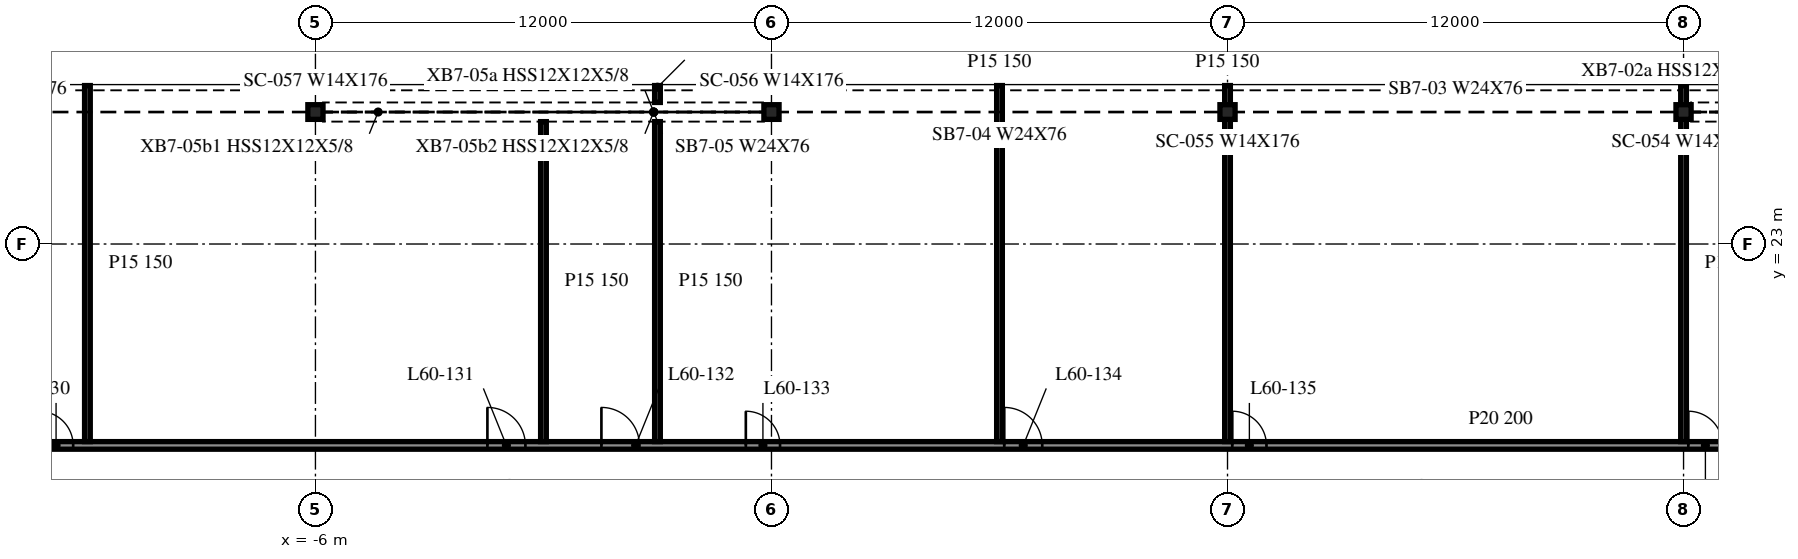
"""IFC4 building model, lengths in metres.
Left out: names, types, materials, properties, quantities, classifications, styles, units other than length and angle.
Written with IfcOpenShell. Run it as: python <this file> out.ifc"""

import sys

from ifc_helpers import new_model, si_unit, direction, frame, frame_2d, origin, origin_2d, place, context, subcontext, project, spatial, rectangle, i_section, extrude, element, fill, save


model = new_model("IFC4")
c1 = context("Model", 3, precision=1e-05, world=origin(), true_north=direction((0.0, 1.0)))
c2 = subcontext(c1, "Body", "Model", "MODEL_VIEW")
j1 = project(units=[si_unit("LENGTHUNIT", "METRE"), si_unit("PLANEANGLEUNIT", "RADIAN")], contexts=[c1])
p1 = place(None, origin())
s1 = spatial("IfcSite", under=j1, at=p1, CompositionType="ELEMENT")
p2 = place(p1, origin())
s2 = spatial("IfcBuilding", under=s1, at=p2, CompositionType="ELEMENT")
p3 = place(p2, frame((0.0, 0.0, 247.6)))
s3 = spatial("IfcBuildingStorey", under=s2, at=p3, CompositionType="ELEMENT", Elevation=247.6)
for number, where, z_axis, x_axis in (
    (1, (30.0, 26.473, -0.34), (0.0, 0.0, 1.0), (1.0, 0.0, 0.0)),
    (2, (18.0, 26.473, -0.34), (0.0, 0.0, 1.0), (1.0, 0.0, 0.0)),
    (3, (6.0, 26.473, -0.34), (0.0, 0.0, 1.0), (1.0, 0.0, 0.0)),
    (4, (-6.0, 26.473, -0.34), (0.0, 0.0, 1.0), (1.0, 0.0, 0.0)),
):
    element("IfcColumn", number, at=place(p3, frame(where, z_axis=z_axis, x_axis=x_axis)), inside=s3, PredefinedType="COLUMN", context=c2, shape_type="SweptSolid", body=[
        extrude(i_section(OverallWidth=0.399, OverallDepth=0.386, WebThickness=0.021, FlangeThickness=0.033, at=origin_2d()), origin(), (0.0, 0.0, 1.0), 3.8),
    ])
p4 = place(p3, frame((-41.975, 17.7, 0.0), z_axis=(0.0, 0.0, 1.0), x_axis=(1.0, 0.0, 0.0)))
e5 = element("IfcWall", 5, at=p4, inside=s3, PredefinedType="PARTITIONING", context=c2, shape_type="SweptSolid", body=[
    extrude(rectangle(XDim=95.95, YDim=0.2, at=frame_2d((47.975, 0.0))), origin(), (0.0, 0.0, 1.0), 3.46),
])
p5 = place(p4, frame((10.7, 0.0, 0.0)))
e6 = element("IfcOpeningElement", 6, at=p5, cuts=e5, PredefinedType="OPENING", context=c2, shape_type="SweptSolid", body=[
    extrude(rectangle(XDim=0.9, YDim=2.1, at=frame_2d((0.45, 1.05))), frame((0.0, 0.11, 0.0), z_axis=(0.0, -1.0, 0.0), x_axis=(1.0, 0.0, 0.0)), (0.0, 0.0, 1.0), 0.22),
])
p6 = place(p4, frame((13.5, 0.0, 0.0)))
e7 = element("IfcOpeningElement", 7, at=p6, cuts=e5, PredefinedType="OPENING", context=c2, shape_type="SweptSolid", body=[
    extrude(rectangle(XDim=1.0, YDim=2.1, at=frame_2d((0.5, 1.05))), frame((0.0, 0.11, 0.0), z_axis=(0.0, -1.0, 0.0), x_axis=(1.0, 0.0, 0.0)), (0.0, 0.0, 1.0), 0.22),
])
p7 = place(p4, frame((22.7, 0.0, 0.0)))
e8 = element("IfcOpeningElement", 8, at=p7, cuts=e5, PredefinedType="OPENING", context=c2, shape_type="SweptSolid", body=[
    extrude(rectangle(XDim=0.9, YDim=2.1, at=frame_2d((0.45, 1.05))), frame((0.0, 0.11, 0.0), z_axis=(0.0, -1.0, 0.0), x_axis=(1.0, 0.0, 0.0)), (0.0, 0.0, 1.0), 0.22),
])
p8 = place(p4, frame((28.7, 0.0, 0.0)))
e9 = element("IfcOpeningElement", 9, at=p8, cuts=e5, PredefinedType="OPENING", context=c2, shape_type="SweptSolid", body=[
    extrude(rectangle(XDim=0.9, YDim=2.1, at=frame_2d((0.45, 1.05))), frame((0.0, 0.11, 0.0), z_axis=(0.0, -1.0, 0.0), x_axis=(1.0, 0.0, 0.0)), (0.0, 0.0, 1.0), 0.22),
])
p9 = place(p4, frame((40.5, 0.0, 0.0)))
e10 = element("IfcOpeningElement", 10, at=p9, cuts=e5, PredefinedType="OPENING", context=c2, shape_type="SweptSolid", body=[
    extrude(rectangle(XDim=1.0, YDim=2.1, at=frame_2d((0.5, 1.05))), frame((0.0, 0.11, 0.0), z_axis=(0.0, -1.0, 0.0), x_axis=(1.0, 0.0, 0.0)), (0.0, 0.0, 1.0), 0.22),
])
p10 = place(p4, frame((43.5, 0.0, 0.0)))
e11 = element("IfcOpeningElement", 11, at=p10, cuts=e5, PredefinedType="OPENING", context=c2, shape_type="SweptSolid", body=[
    extrude(rectangle(XDim=1.0, YDim=2.1, at=frame_2d((0.5, 1.05))), frame((0.0, 0.11, 0.0), z_axis=(0.0, -1.0, 0.0), x_axis=(1.0, 0.0, 0.0)), (0.0, 0.0, 1.0), 0.22),
])
p11 = place(p4, frame((47.3, 0.0, 0.0)))
e12 = element("IfcOpeningElement", 12, at=p11, cuts=e5, PredefinedType="OPENING", context=c2, shape_type="SweptSolid", body=[
    extrude(rectangle(XDim=0.9, YDim=2.1, at=frame_2d((0.45, 1.05))), frame((0.0, 0.11, 0.0), z_axis=(0.0, -1.0, 0.0), x_axis=(1.0, 0.0, 0.0)), (0.0, 0.0, 1.0), 0.22),
])
p12 = place(p4, frame((54.1, 0.0, 0.0)))
e13 = element("IfcOpeningElement", 13, at=p12, cuts=e5, PredefinedType="OPENING", context=c2, shape_type="SweptSolid", body=[
    extrude(rectangle(XDim=1.0, YDim=2.1, at=frame_2d((0.5, 1.05))), frame((0.0, 0.11, 0.0), z_axis=(0.0, -1.0, 0.0), x_axis=(1.0, 0.0, 0.0)), (0.0, 0.0, 1.0), 0.22),
])
p13 = place(p4, frame((60.1, 0.0, 0.0)))
e14 = element("IfcOpeningElement", 14, at=p13, cuts=e5, PredefinedType="OPENING", context=c2, shape_type="SweptSolid", body=[
    extrude(rectangle(XDim=0.9, YDim=2.1, at=frame_2d((0.45, 1.05))), frame((0.0, 0.11, 0.0), z_axis=(0.0, -1.0, 0.0), x_axis=(1.0, 0.0, 0.0)), (0.0, 0.0, 1.0), 0.22),
])
p14 = place(p4, frame((72.1, 0.0, 0.0)))
e15 = element("IfcOpeningElement", 15, at=p14, cuts=e5, PredefinedType="OPENING", context=c2, shape_type="SweptSolid", body=[
    extrude(rectangle(XDim=0.9, YDim=2.1, at=frame_2d((0.45, 1.05))), frame((0.0, 0.11, 0.0), z_axis=(0.0, -1.0, 0.0), x_axis=(1.0, 0.0, 0.0)), (0.0, 0.0, 1.0), 0.22),
])
p15 = place(p4, frame((75.1, 0.0, 0.0)))
e16 = element("IfcOpeningElement", 16, at=p15, cuts=e5, PredefinedType="OPENING", context=c2, shape_type="SweptSolid", body=[
    extrude(rectangle(XDim=1.0, YDim=2.1, at=frame_2d((0.5, 1.05))), frame((0.0, 0.11, 0.0), z_axis=(0.0, -1.0, 0.0), x_axis=(1.0, 0.0, 0.0)), (0.0, 0.0, 1.0), 0.22),
])
p16 = place(p4, frame((84.1, 0.0, 0.0)))
e17 = element("IfcOpeningElement", 17, at=p16, cuts=e5, PredefinedType="OPENING", context=c2, shape_type="SweptSolid", body=[
    extrude(rectangle(XDim=1.0, YDim=2.1, at=frame_2d((0.5, 1.05))), frame((0.0, 0.11, 0.0), z_axis=(0.0, -1.0, 0.0), x_axis=(1.0, 0.0, 0.0)), (0.0, 0.0, 1.0), 0.22),
])
p17 = place(p4, frame((90.1, 0.0, 0.0)))
e18 = element("IfcOpeningElement", 18, at=p17, cuts=e5, PredefinedType="OPENING", context=c2, shape_type="SweptSolid", body=[
    extrude(rectangle(XDim=0.9, YDim=2.1, at=frame_2d((0.45, 1.05))), frame((0.0, 0.11, 0.0), z_axis=(0.0, -1.0, 0.0), x_axis=(1.0, 0.0, 0.0)), (0.0, 0.0, 1.0), 0.22),
])
p18 = place(p3, frame((-12.0, 17.8, 0.0), z_axis=(0.0, 0.0, 1.0), x_axis=(0.0, 1.0, 0.0)))
e19 = element("IfcWall", 19, at=p18, inside=s3, PredefinedType="PARTITIONING", context=c2, shape_type="SweptSolid", body=[
    extrude(rectangle(XDim=9.37, YDim=0.15, at=frame_2d((4.685, 0.0))), origin(), (0.0, 0.0, 1.0), 3.46),
])
for number, where, z_axis, x_axis in (
    (20, (0.0, 17.8, 0.0), (0.0, 0.0, 1.0), (0.0, 1.0, 0.0)),
    (21, (3.0, 17.8, 0.0), (0.0, 0.0, 1.0), (0.0, 1.0, 0.0)),
):
    element("IfcWall", number, at=place(p3, frame(where, z_axis=z_axis, x_axis=x_axis)), inside=s3, PredefinedType="PARTITIONING", context=c2, shape_type="SweptSolid", body=[
        extrude(rectangle(XDim=8.421, YDim=0.15, at=frame_2d((4.21, 0.0))), origin(), (0.0, 0.0, 1.0), 3.46),
    ])
p19 = place(p3, frame((3.0, 26.725, 0.0), z_axis=(0.0, 0.0, 1.0), x_axis=(0.0, 1.0, 0.0)))
e22 = element("IfcWall", 22, at=p19, inside=s3, PredefinedType="PARTITIONING", context=c2, shape_type="SweptSolid", body=[
    extrude(rectangle(XDim=0.445, YDim=0.15, at=frame_2d((0.222, 0.0))), origin(), (0.0, 0.0, 1.0), 3.46),
])
for number, where, z_axis, x_axis in (
    (23, (12.0, 17.8, 0.0), (0.0, 0.0, 1.0), (0.0, 1.0, 0.0)),
    (24, (18.0, 17.8, 0.0), (0.0, 0.0, 1.0), (0.0, 1.0, 0.0)),
    (25, (30.0, 17.8, 0.0), (0.0, 0.0, 1.0), (0.0, 1.0, 0.0)),
):
    element("IfcWall", number, at=place(p3, frame(where, z_axis=z_axis, x_axis=x_axis)), inside=s3, PredefinedType="PARTITIONING", context=c2, shape_type="SweptSolid", body=[
        extrude(rectangle(XDim=9.37, YDim=0.15, at=frame_2d((4.685, 0.0))), origin(), (0.0, 0.0, 1.0), 3.46),
    ])
p20 = place(p8, origin())
e26 = element("IfcDoor", 26, at=p20, inside=s3, OperationType="SINGLE_SWING_LEFT", PredefinedType="DOOR", context=c2, shape_type="SweptSolid", body=[
    extrude(rectangle(XDim=0.9, YDim=2.1, at=frame_2d((0.45, 1.05))), frame((0.0, 0.025, 0.0), z_axis=(0.0, -1.0, 0.0), x_axis=(1.0, 0.0, 0.0)), (0.0, 0.0, 1.0), 0.05),
])
fill(e9, e26)
p21 = place(p9, origin())
e27 = element("IfcDoor", 27, at=p21, inside=s3, OperationType="SINGLE_SWING_LEFT", PredefinedType="DOOR", context=c2, shape_type="SweptSolid", body=[
    extrude(rectangle(XDim=1.0, YDim=2.1, at=frame_2d((0.5, 1.05))), frame((0.0, 0.025, 0.0), z_axis=(0.0, -1.0, 0.0), x_axis=(1.0, 0.0, 0.0)), (0.0, 0.0, 1.0), 0.05),
])
fill(e10, e27)
p22 = place(p10, origin())
e28 = element("IfcDoor", 28, at=p22, inside=s3, OperationType="SINGLE_SWING_LEFT", PredefinedType="DOOR", context=c2, shape_type="SweptSolid", body=[
    extrude(rectangle(XDim=1.0, YDim=2.1, at=frame_2d((0.5, 1.05))), frame((0.0, 0.025, 0.0), z_axis=(0.0, -1.0, 0.0), x_axis=(1.0, 0.0, 0.0)), (0.0, 0.0, 1.0), 0.05),
])
fill(e11, e28)
p23 = place(p11, origin())
e29 = element("IfcDoor", 29, at=p23, inside=s3, OperationType="SINGLE_SWING_LEFT", PredefinedType="DOOR", context=c2, shape_type="SweptSolid", body=[
    extrude(rectangle(XDim=0.9, YDim=2.1, at=frame_2d((0.45, 1.05))), frame((0.0, 0.025, 0.0), z_axis=(0.0, -1.0, 0.0), x_axis=(1.0, 0.0, 0.0)), (0.0, 0.0, 1.0), 0.05),
])
fill(e12, e29)
p24 = place(p12, origin())
e30 = element("IfcDoor", 30, at=p24, inside=s3, OperationType="SINGLE_SWING_RIGHT", PredefinedType="DOOR", context=c2, shape_type="SweptSolid", body=[
    extrude(rectangle(XDim=1.0, YDim=2.1, at=frame_2d((0.5, 1.05))), frame((0.0, 0.025, 0.0), z_axis=(0.0, -1.0, 0.0), x_axis=(1.0, 0.0, 0.0)), (0.0, 0.0, 1.0), 0.05),
])
fill(e13, e30)
p25 = place(p13, origin())
e31 = element("IfcDoor", 31, at=p25, inside=s3, OperationType="SINGLE_SWING_RIGHT", PredefinedType="DOOR", context=c2, shape_type="SweptSolid", body=[
    extrude(rectangle(XDim=0.9, YDim=2.1, at=frame_2d((0.45, 1.05))), frame((0.0, 0.025, 0.0), z_axis=(0.0, -1.0, 0.0), x_axis=(1.0, 0.0, 0.0)), (0.0, 0.0, 1.0), 0.05),
])
fill(e14, e31)
p26 = place(p14, origin())
e32 = element("IfcDoor", 32, at=p26, inside=s3, OperationType="SINGLE_SWING_RIGHT", PredefinedType="DOOR", context=c2, shape_type="SweptSolid", body=[
    extrude(rectangle(XDim=0.9, YDim=2.1, at=frame_2d((0.45, 1.05))), frame((0.0, 0.025, 0.0), z_axis=(0.0, -1.0, 0.0), x_axis=(1.0, 0.0, 0.0)), (0.0, 0.0, 1.0), 0.05),
])
fill(e15, e32)
save(model, sys.argv[1])
